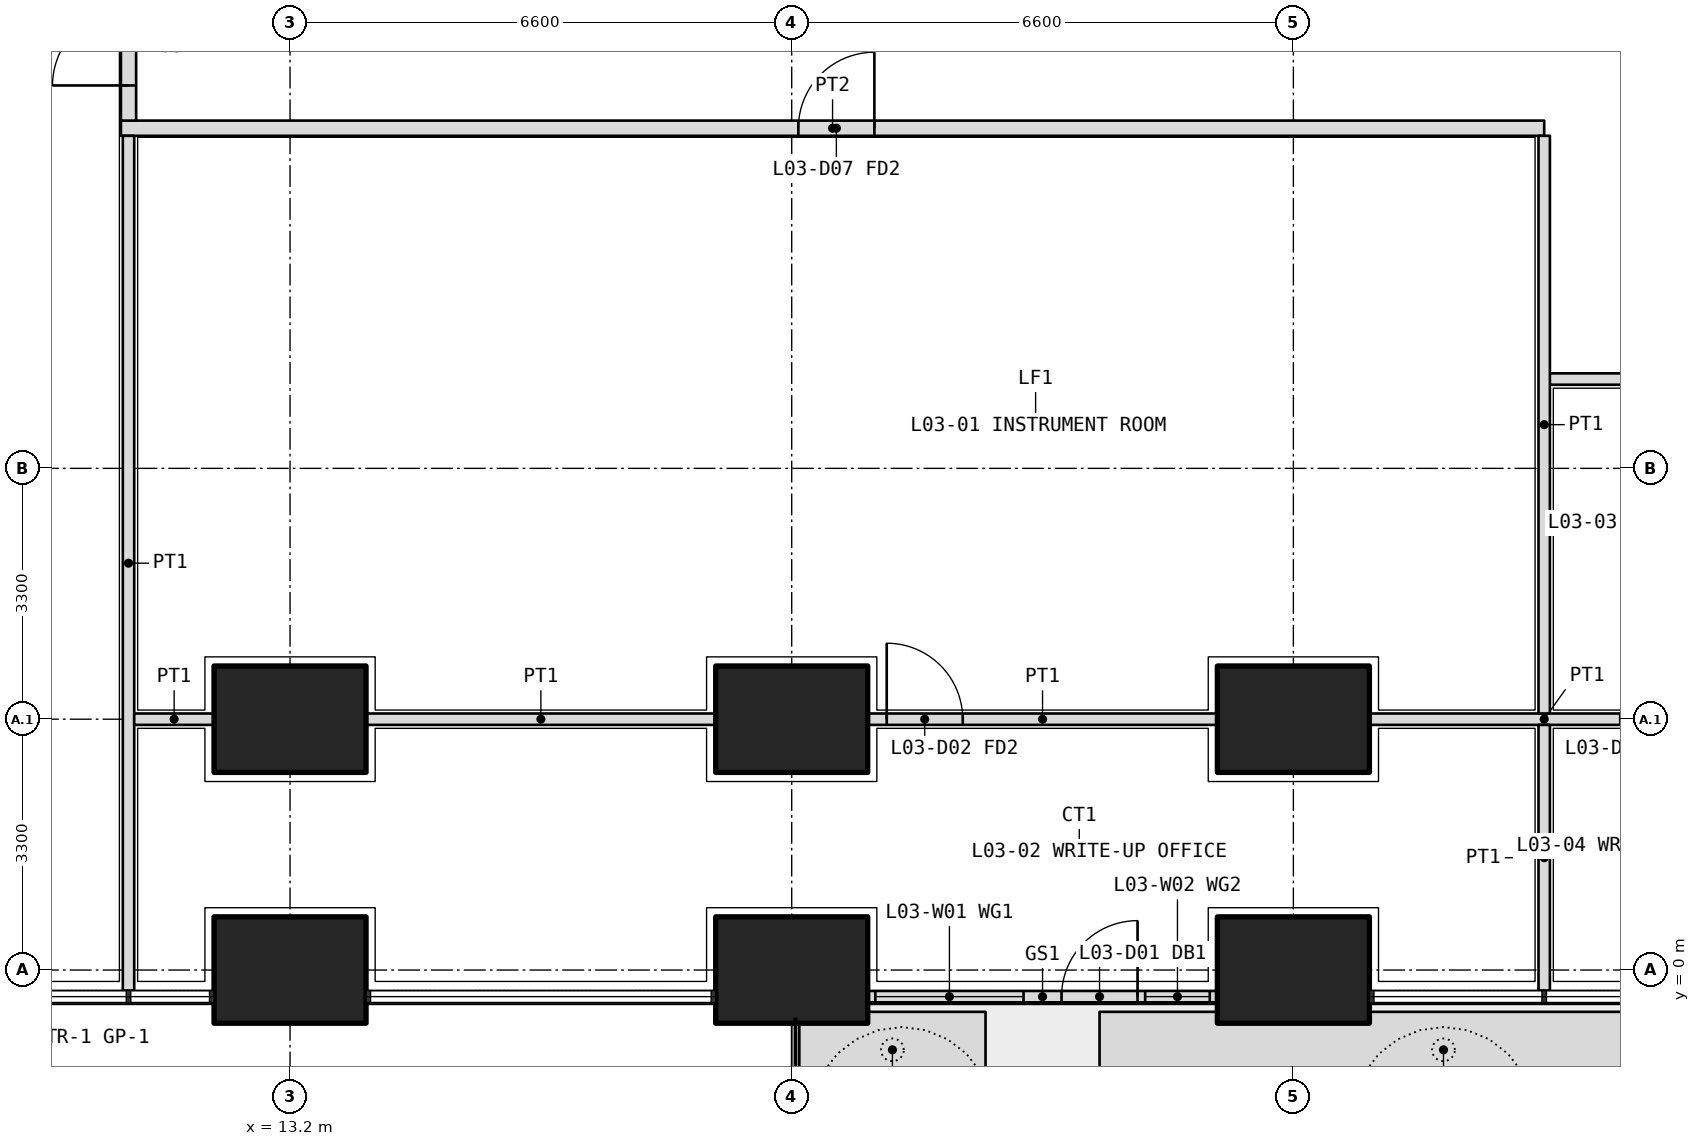
"""IFC4 building model, lengths in metres.
Left out: names, types, materials, properties, quantities, classifications, styles, units other than length and angle.
Written with IfcOpenShell. Run it as: python <this file> out.ifc"""

import sys

from ifc_helpers import new_model, si_unit, direction, frame, frame_2d, origin, origin_2d, place, context, subcontext, project, spatial, polyline, rectangle, outline, extrude, element, fill, save


model = new_model("IFC4")
c1 = context("Model", 3, precision=1e-05, world=origin(), true_north=direction((0.0, 1.0)))
c2 = subcontext(c1, "Body", "Model", "MODEL_VIEW")
j1 = project(units=[si_unit("LENGTHUNIT", "METRE"), si_unit("PLANEANGLEUNIT", "RADIAN")], contexts=[c1])
p1 = place(None, origin())
s1 = spatial("IfcSite", under=j1, at=p1, CompositionType="ELEMENT")
p2 = place(p1, origin())
s2 = spatial("IfcBuilding", under=s1, at=p2, CompositionType="ELEMENT")
p3 = place(p2, frame((0.0, 0.0, 17.1)))
s3 = spatial("IfcBuildingStorey", under=s2, at=p3, CompositionType="ELEMENT", Elevation=17.1)
for number, where, z_axis, x_axis in (
    (1, (13.2, 0.0, 0.0), (0.0, 0.0, 1.0), (1.0, 0.0, 0.0)),
    (2, (19.8, 0.0, 0.0), (0.0, 0.0, 1.0), (1.0, 0.0, 0.0)),
    (3, (26.4, 0.0, 0.0), (0.0, 0.0, 1.0), (1.0, 0.0, 0.0)),
    (4, (13.2, 3.3, 0.0), (0.0, 0.0, 1.0), (1.0, 0.0, 0.0)),
    (5, (19.8, 3.3, 0.0), (0.0, 0.0, 1.0), (1.0, 0.0, 0.0)),
    (6, (26.4, 3.3, 0.0), (0.0, 0.0, 1.0), (1.0, 0.0, 0.0)),
):
    element("IfcColumn", number, at=place(p3, frame(where, z_axis=z_axis, x_axis=x_axis)), inside=s3, PredefinedType="COLUMN", context=c2, shape_type="SweptSolid", body=[
        extrude(rectangle(XDim=2.0, YDim=1.4, at=origin_2d()), origin(), (0.0, 0.0, 1.0), 4.2),
    ])
p4 = place(p3, origin())
e7 = element("IfcWall", 7, at=p4, inside=s3, PredefinedType="USERDEFINED", context=c2, shape_type="SweptSolid", body=[
    extrude(outline(polyline([(19.9, -1.55), (22.35, -1.55), (22.35, -0.55), (19.9, -0.55), (19.9, -1.55)]), holes=[polyline([(20.05, -1.4), (22.2, -1.4), (22.2, -0.7), (20.05, -0.7), (20.05, -1.4)])]), origin(), (0.0, 0.0, 1.0), 1.05),
])
p5 = place(p3, origin())
e8 = element("IfcWall", 8, at=p5, inside=s3, PredefinedType="USERDEFINED", context=c2, shape_type="SweptSolid", body=[
    extrude(outline(polyline([(23.85, -1.55), (32.9, -1.55), (32.9, -0.55), (23.85, -0.55), (23.85, -1.55)]), holes=[polyline([(24.0, -1.4), (32.75, -1.4), (32.75, -0.7), (24.0, -0.7), (24.0, -1.4)])]), origin(), (0.0, 0.0, 1.0), 1.05),
])
p6 = place(p3, frame((20.8, -0.35, 0.0), z_axis=(0.0, 0.0, 1.0), x_axis=(1.0, 0.0, 0.0)))
e9 = element("IfcWall", 9, at=p6, inside=s3, PredefinedType="SOLIDWALL", context=c2, shape_type="SweptSolid", body=[
    extrude(rectangle(XDim=4.6, YDim=0.15, at=frame_2d((2.3, 0.0))), origin(), (0.0, 0.0, 1.0), 2.7),
])
p7 = place(p6, frame((2.55, 0.0, 0.0)))
e10 = element("IfcOpeningElement", 10, at=p7, cuts=e9, PredefinedType="OPENING", context=c2, shape_type="SweptSolid", body=[
    extrude(rectangle(XDim=1.0, YDim=2.4, at=frame_2d((0.5, 1.2))), frame((0.0, 0.085, 0.0), z_axis=(0.0, -1.0, 0.0), x_axis=(1.0, 0.0, 0.0)), (0.0, 0.0, 1.0), 0.17),
])
p8 = place(p6, frame((0.1, 0.0, 0.1)))
e11 = element("IfcOpeningElement", 11, at=p8, cuts=e9, PredefinedType="OPENING", context=c2, shape_type="SweptSolid", body=[
    extrude(rectangle(XDim=1.95, YDim=2.3, at=frame_2d((0.975, 1.15))), frame((0.0, 0.085, 0.0), z_axis=(0.0, -1.0, 0.0), x_axis=(1.0, 0.0, 0.0)), (0.0, 0.0, 1.0), 0.17),
])
p9 = place(p6, frame((3.65, 0.0, 0.1)))
e12 = element("IfcOpeningElement", 12, at=p9, cuts=e9, PredefinedType="OPENING", context=c2, shape_type="SweptSolid", body=[
    extrude(rectangle(XDim=0.85, YDim=2.3, at=frame_2d((0.425, 1.15))), frame((0.0, 0.085, 0.0), z_axis=(0.0, -1.0, 0.0), x_axis=(1.0, 0.0, 0.0)), (0.0, 0.0, 1.0), 0.17),
])
p10 = place(p3, frame((10.975, 11.075, 0.0), z_axis=(0.0, 0.0, 1.0), x_axis=(1.0, 0.0, 0.0)))
e13 = element("IfcWall", 13, at=p10, inside=s3, PredefinedType="PARTITIONING", context=c2, shape_type="SweptSolid", body=[
    extrude(rectangle(XDim=18.725, YDim=0.2, at=frame_2d((9.362, 0.0))), origin(), (0.0, 0.0, 1.0), 2.85),
])
p11 = place(p10, frame((8.913, 0.0, 0.0)))
e14 = element("IfcOpeningElement", 14, at=p11, cuts=e13, PredefinedType="OPENING", context=c2, shape_type="SweptSolid", body=[
    extrude(rectangle(XDim=1.0, YDim=2.1, at=frame_2d((0.5, 1.05))), frame((0.0, 0.11, 0.0), z_axis=(0.0, -1.0, 0.0), x_axis=(1.0, 0.0, 0.0)), (0.0, 0.0, 1.0), 0.22),
])
p12 = place(p3, frame((11.075, 11.175, 0.0), z_axis=(0.0, 0.0, 1.0), x_axis=(0.0, 1.0, 0.0)))
e15 = element("IfcWall", 15, at=p12, inside=s3, PredefinedType="PARTITIONING", context=c2, shape_type="SweptSolid", body=[
    extrude(rectangle(XDim=23.85, YDim=0.2, at=frame_2d((11.925, 0.0))), origin(), (0.0, 0.0, 1.0), 2.85),
])
p13 = place(p12, frame((0.462, 0.0, 0.0)))
e16 = element("IfcOpeningElement", 16, at=p13, cuts=e15, PredefinedType="OPENING", context=c2, shape_type="SweptSolid", body=[
    extrude(rectangle(XDim=1.0, YDim=2.1, at=frame_2d((0.5, 1.05))), frame((0.0, 0.11, 0.0), z_axis=(0.0, -1.0, 0.0), x_axis=(1.0, 0.0, 0.0)), (0.0, 0.0, 1.0), 0.22),
])
p14 = place(p12, frame((2.575, 0.0, 0.0)))
e17 = element("IfcOpeningElement", 17, at=p14, cuts=e15, PredefinedType="OPENING", context=c2, shape_type="SweptSolid", body=[
    extrude(rectangle(XDim=1.0, YDim=2.1, at=frame_2d((0.5, 1.05))), frame((0.0, 0.11, 0.0), z_axis=(0.0, -1.0, 0.0), x_axis=(1.0, 0.0, 0.0)), (0.0, 0.0, 1.0), 0.22),
])
p15 = place(p12, frame((5.65, 0.0, 0.0)))
e18 = element("IfcOpeningElement", 18, at=p15, cuts=e15, PredefinedType="OPENING", context=c2, shape_type="SweptSolid", body=[
    extrude(rectangle(XDim=0.9, YDim=2.1, at=frame_2d((0.45, 1.05))), frame((0.0, 0.11, 0.0), z_axis=(0.0, -1.0, 0.0), x_axis=(1.0, 0.0, 0.0)), (0.0, 0.0, 1.0), 0.22),
])
p16 = place(p12, frame((9.5, 0.0, 0.0)))
e19 = element("IfcOpeningElement", 19, at=p16, cuts=e15, PredefinedType="OPENING", context=c2, shape_type="SweptSolid", body=[
    extrude(rectangle(XDim=0.9, YDim=2.1, at=frame_2d((0.45, 1.05))), frame((0.0, 0.11, 0.0), z_axis=(0.0, -1.0, 0.0), x_axis=(1.0, 0.0, 0.0)), (0.0, 0.0, 1.0), 0.22),
])
p17 = place(p12, frame((13.025, 0.0, 0.0)))
e20 = element("IfcOpeningElement", 20, at=p17, cuts=e15, PredefinedType="OPENING", context=c2, shape_type="SweptSolid", body=[
    extrude(rectangle(XDim=1.0, YDim=2.1, at=frame_2d((0.5, 1.05))), frame((0.0, 0.11, 0.0), z_axis=(0.0, -1.0, 0.0), x_axis=(1.0, 0.0, 0.0)), (0.0, 0.0, 1.0), 0.22),
])
p18 = place(p12, frame((16.375, 0.0, 0.0)))
e21 = element("IfcOpeningElement", 21, at=p18, cuts=e15, PredefinedType="OPENING", context=c2, shape_type="SweptSolid", body=[
    extrude(rectangle(XDim=1.0, YDim=2.1, at=frame_2d((0.5, 1.05))), frame((0.0, 0.11, 0.0), z_axis=(0.0, -1.0, 0.0), x_axis=(1.0, 0.0, 0.0)), (0.0, 0.0, 1.0), 0.22),
])
p19 = place(p12, frame((20.738, 0.0, 0.0)))
e22 = element("IfcOpeningElement", 22, at=p19, cuts=e15, PredefinedType="OPENING", context=c2, shape_type="SweptSolid", body=[
    extrude(rectangle(XDim=1.0, YDim=2.1, at=frame_2d((0.5, 1.05))), frame((0.0, 0.11, 0.0), z_axis=(0.0, -1.0, 0.0), x_axis=(1.0, 0.0, 0.0)), (0.0, 0.0, 1.0), 0.22),
])
p20 = place(p3, frame((11.075, -0.27, 0.0), z_axis=(0.0, 0.0, 1.0), x_axis=(0.0, 1.0, 0.0)))
e23 = element("IfcWall", 23, at=p20, inside=s3, PredefinedType="PARTITIONING", context=c2, shape_type="SweptSolid", body=[
    extrude(rectangle(XDim=11.245, YDim=0.15, at=frame_2d((5.623, 0.0))), origin(), (0.0, 0.0, 1.0), 2.7),
])
p21 = place(p3, frame((11.15, 3.3, 0.0), z_axis=(0.0, 0.0, 1.0), x_axis=(1.0, 0.0, 0.0)))
e24 = element("IfcWall", 24, at=p21, inside=s3, PredefinedType="PARTITIONING", context=c2, shape_type="SweptSolid", body=[
    extrude(rectangle(XDim=1.05, YDim=0.15, at=frame_2d((0.525, 0.0))), origin(), (0.0, 0.0, 1.0), 3.9),
])
p22 = place(p3, frame((14.2, 3.3, 0.0), z_axis=(0.0, 0.0, 1.0), x_axis=(1.0, 0.0, 0.0)))
e25 = element("IfcWall", 25, at=p22, inside=s3, PredefinedType="PARTITIONING", context=c2, shape_type="SweptSolid", body=[
    extrude(rectangle(XDim=4.6, YDim=0.15, at=frame_2d((2.3, 0.0))), origin(), (0.0, 0.0, 1.0), 3.9),
])
p23 = place(p3, frame((20.8, 3.3, 0.0), z_axis=(0.0, 0.0, 1.0), x_axis=(1.0, 0.0, 0.0)))
e26 = element("IfcWall", 26, at=p23, inside=s3, PredefinedType="PARTITIONING", context=c2, shape_type="SweptSolid", body=[
    extrude(rectangle(XDim=4.6, YDim=0.15, at=frame_2d((2.3, 0.0))), origin(), (0.0, 0.0, 1.0), 3.9),
])
p24 = place(p23, frame((0.25, 0.0, 0.0)))
e27 = element("IfcOpeningElement", 27, at=p24, cuts=e26, PredefinedType="OPENING", context=c2, shape_type="SweptSolid", body=[
    extrude(rectangle(XDim=1.0, YDim=2.1, at=frame_2d((0.5, 1.05))), frame((0.0, 0.085, 0.0), z_axis=(0.0, -1.0, 0.0), x_axis=(1.0, 0.0, 0.0)), (0.0, 0.0, 1.0), 0.17),
])
p25 = place(p3, frame((27.4, 3.3, 0.0), z_axis=(0.0, 0.0, 1.0), x_axis=(1.0, 0.0, 0.0)))
e28 = element("IfcWall", 28, at=p25, inside=s3, PredefinedType="PARTITIONING", context=c2, shape_type="SweptSolid", body=[
    extrude(rectangle(XDim=4.6, YDim=0.15, at=frame_2d((2.3, 0.0))), origin(), (0.0, 0.0, 1.0), 3.9),
])
p26 = place(p25, frame((3.3, 0.0, 0.0)))
e29 = element("IfcOpeningElement", 29, at=p26, cuts=e28, PredefinedType="OPENING", context=c2, shape_type="SweptSolid", body=[
    extrude(rectangle(XDim=1.0, YDim=2.1, at=frame_2d((0.5, 1.05))), frame((0.0, 0.085, 0.0), z_axis=(0.0, -1.0, 0.0), x_axis=(1.0, 0.0, 0.0)), (0.0, 0.0, 1.0), 0.17),
])
p27 = place(p3, frame((29.7, 7.775, 0.0), z_axis=(0.0, 0.0, 1.0), x_axis=(1.0, 0.0, 0.0)))
e30 = element("IfcWall", 30, at=p27, inside=s3, PredefinedType="PARTITIONING", context=c2, shape_type="SweptSolid", body=[
    extrude(rectangle(XDim=3.3, YDim=0.15, at=frame_2d((1.65, 0.0))), origin(), (0.0, 0.0, 1.0), 2.85),
])
p28 = place(p27, frame((1.05, 0.0, 0.0)))
e31 = element("IfcOpeningElement", 31, at=p28, cuts=e30, PredefinedType="OPENING", context=c2, shape_type="SweptSolid", body=[
    extrude(rectangle(XDim=1.2, YDim=2.1, at=frame_2d((0.6, 1.05))), frame((0.0, 0.085, 0.0), z_axis=(0.0, -1.0, 0.0), x_axis=(1.0, 0.0, 0.0)), (0.0, 0.0, 1.0), 0.17),
])
p29 = place(p3, frame((29.7, -0.27, 0.0), z_axis=(0.0, 0.0, 1.0), x_axis=(0.0, 1.0, 0.0)))
e32 = element("IfcWall", 32, at=p29, inside=s3, PredefinedType="PARTITIONING", context=c2, shape_type="SweptSolid", body=[
    extrude(rectangle(XDim=3.495, YDim=0.15, at=frame_2d((1.748, 0.0))), origin(), (0.0, 0.0, 1.0), 2.7),
])
p30 = place(p3, frame((29.7, 3.375, 0.0), z_axis=(0.0, 0.0, 1.0), x_axis=(0.0, 1.0, 0.0)))
e33 = element("IfcWall", 33, at=p30, inside=s3, PredefinedType="PARTITIONING", context=c2, shape_type="SweptSolid", body=[
    extrude(rectangle(XDim=7.6, YDim=0.15, at=frame_2d((3.8, 0.0))), origin(), (0.0, 0.0, 1.0), 3.9),
])
p31 = place(p7, origin())
e34 = element("IfcDoor", 34, at=p31, inside=s3, OperationType="SINGLE_SWING_RIGHT", PredefinedType="DOOR", context=c2, shape_type="SweptSolid", body=[
    extrude(rectangle(XDim=1.0, YDim=2.4, at=frame_2d((0.5, 1.2))), frame((0.0, 0.025, 0.0), z_axis=(0.0, -1.0, 0.0), x_axis=(1.0, 0.0, 0.0)), (0.0, 0.0, 1.0), 0.05),
])
fill(e10, e34)
p32 = place(p8, origin())
e35 = element("IfcWindow", 35, at=p32, inside=s3, PartitioningType="SINGLE_PANEL", PredefinedType="WINDOW", context=c2, shape_type="SweptSolid", body=[
    extrude(rectangle(XDim=1.95, YDim=2.3, at=frame_2d((0.975, 1.15))), frame((0.0, 0.03, 0.0), z_axis=(0.0, -1.0, 0.0), x_axis=(1.0, 0.0, 0.0)), (0.0, 0.0, 1.0), 0.06),
])
fill(e11, e35)
p33 = place(p9, origin())
e36 = element("IfcWindow", 36, at=p33, inside=s3, PartitioningType="SINGLE_PANEL", PredefinedType="WINDOW", context=c2, shape_type="SweptSolid", body=[
    extrude(rectangle(XDim=0.85, YDim=2.3, at=frame_2d((0.425, 1.15))), frame((0.0, 0.03, 0.0), z_axis=(0.0, -1.0, 0.0), x_axis=(1.0, 0.0, 0.0)), (0.0, 0.0, 1.0), 0.06),
])
fill(e12, e36)
p34 = place(p11, origin())
e37 = element("IfcDoor", 37, at=p34, inside=s3, OperationType="SINGLE_SWING_RIGHT", PredefinedType="DOOR", context=c2, shape_type="SweptSolid", body=[
    extrude(rectangle(XDim=1.0, YDim=2.1, at=frame_2d((0.5, 1.05))), frame((0.0, 0.025, 0.0), z_axis=(0.0, -1.0, 0.0), x_axis=(1.0, 0.0, 0.0)), (0.0, 0.0, 1.0), 0.05),
])
fill(e14, e37)
p35 = place(p24, origin())
e38 = element("IfcDoor", 38, at=p35, inside=s3, OperationType="SINGLE_SWING_LEFT", PredefinedType="DOOR", context=c2, shape_type="SweptSolid", body=[
    extrude(rectangle(XDim=1.0, YDim=2.1, at=frame_2d((0.5, 1.05))), frame((0.0, 0.025, 0.0), z_axis=(0.0, -1.0, 0.0), x_axis=(1.0, 0.0, 0.0)), (0.0, 0.0, 1.0), 0.05),
])
fill(e27, e38)
p36 = place(p13, origin())
e39 = element("IfcDoor", 39, at=p36, inside=s3, OperationType="SINGLE_SWING_LEFT", PredefinedType="DOOR", context=c2, shape_type="SweptSolid", body=[
    extrude(rectangle(XDim=1.0, YDim=2.1, at=frame_2d((0.5, 1.05))), frame((0.0, 0.025, 0.0), z_axis=(0.0, -1.0, 0.0), x_axis=(1.0, 0.0, 0.0)), (0.0, 0.0, 1.0), 0.05),
])
fill(e16, e39)
save(model, sys.argv[1])
